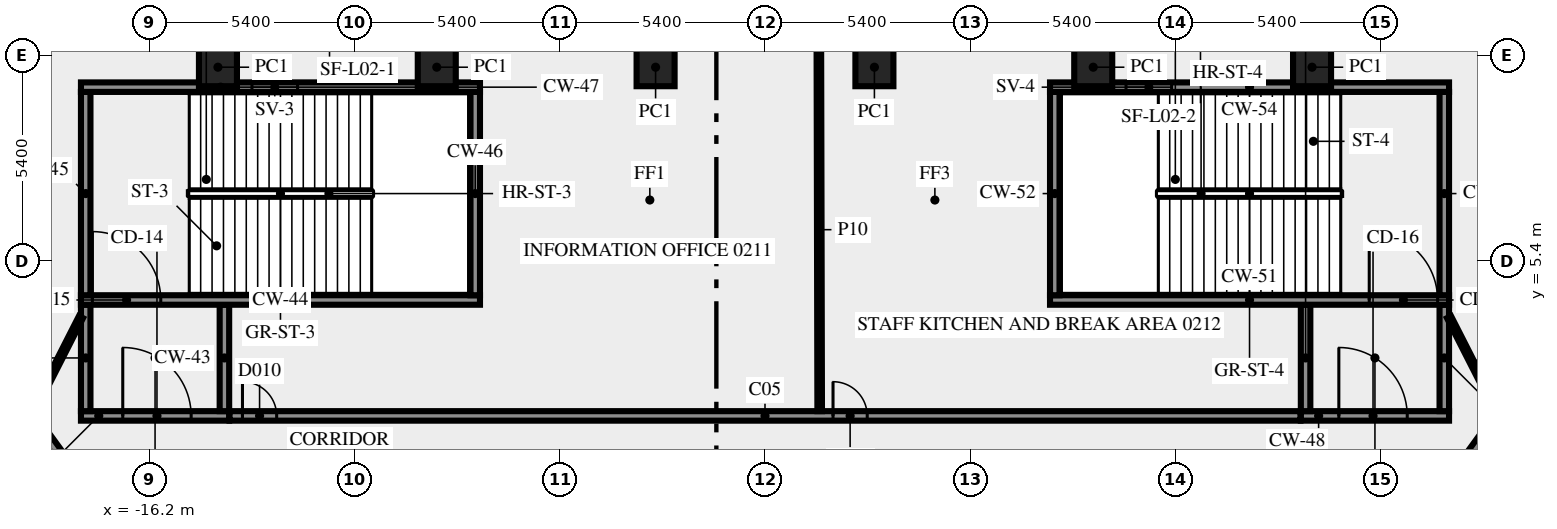
"""IFC4 building model, lengths in metres.
Left out: names, types, materials, properties, quantities, classifications, styles, units other than length and angle.
Written with IfcOpenShell. Run it as: python <this file> out.ifc"""

import sys

from ifc_helpers import new_model, si_unit, direction, frame, frame_2d, origin, origin_2d, place, context, subcontext, project, spatial, rectangle, extrude, element, fill, save


model = new_model("IFC4")
c1 = context("Model", 3, precision=1e-05, world=origin(), true_north=direction((0.0, 1.0)))
c2 = subcontext(c1, "Body", "Model", "MODEL_VIEW")
j1 = project(units=[si_unit("LENGTHUNIT", "METRE"), si_unit("PLANEANGLEUNIT", "RADIAN")], contexts=[c1])
p1 = place(None, origin())
s1 = spatial("IfcSite", under=j1, at=p1, CompositionType="ELEMENT")
p2 = place(p1, origin())
s2 = spatial("IfcBuilding", under=s1, at=p2, CompositionType="ELEMENT")
p3 = place(p2, frame((0.0, 0.0, 11.5)))
s3 = spatial("IfcBuildingStorey", under=s2, at=p3, CompositionType="ELEMENT", Elevation=11.5)
for number, where, z_axis, x_axis in (
    (1, (14.395, 10.5, 0.0), (0.0, 0.0, 1.0), (-1.0, 0.0, 0.0)),
    (2, (8.637, 10.5, 0.0), (0.0, 0.0, 1.0), (-1.0, 0.0, 0.0)),
    (3, (2.879, 10.5, 0.0), (0.0, 0.0, 1.0), (-1.0, 0.0, 0.0)),
    (4, (-2.879, 10.5, 0.0), (0.0, 0.0, 1.0), (-1.0, 0.0, 0.0)),
    (5, (-8.637, 10.5, 0.0), (0.0, 0.0, 1.0), (-1.0, 0.0, 0.0)),
    (6, (-14.395, 10.5, 0.0), (0.0, 0.0, 1.0), (-1.0, 0.0, 0.0)),
):
    element("IfcColumn", number, at=place(p3, frame(where, z_axis=z_axis, x_axis=x_axis)), inside=s3, PredefinedType="COLUMN", context=c2, shape_type="SweptSolid", body=[
        extrude(rectangle(XDim=1.0, YDim=1.0, at=origin_2d()), origin(), (0.0, 0.0, 1.0), 4.1),
    ])
p4 = place(p3, frame((-18.0, 1.325, 0.0), z_axis=(0.0, 0.0, 1.0), x_axis=(1.0, 0.0, 0.0)))
e7 = element("IfcWall", 7, at=p4, inside=s3, PredefinedType="SHEAR", context=c2, shape_type="SweptSolid", body=[
    extrude(rectangle(XDim=3.9, YDim=0.25, at=frame_2d((1.95, 0.0))), origin(), (0.0, 0.0, 1.0), 4.1),
])
p5 = place(p4, frame((1.1, 0.0, 0.0)))
e8 = element("IfcOpeningElement", 8, at=p5, cuts=e7, PredefinedType="OPENING", context=c2, shape_type="SweptSolid", body=[
    extrude(rectangle(XDim=1.8, YDim=2.1, at=frame_2d((0.9, 1.05))), frame((0.0, 0.135, 0.0), z_axis=(0.0, -1.0, 0.0), x_axis=(1.0, 0.0, 0.0)), (0.0, 0.0, 1.0), 0.27),
])
for number, where, z_axis, x_axis in (
    (9, (-17.875, 1.45, 0.0), (0.0, 0.0, 1.0), (0.0, 1.0, 0.0)),
    (10, (-14.225, 1.45, 0.0), (0.0, 0.0, 1.0), (0.0, 1.0, 0.0)),
):
    element("IfcWall", number, at=place(p3, frame(where, z_axis=z_axis, x_axis=x_axis)), inside=s3, PredefinedType="SHEAR", context=c2, shape_type="SweptSolid", body=[
        extrude(rectangle(XDim=2.8, YDim=0.25, at=frame_2d((1.4, 0.0))), origin(), (0.0, 0.0, 1.0), 4.1),
    ])
p6 = place(p3, frame((-18.0, 4.375, 0.0), z_axis=(0.0, 0.0, 1.0), x_axis=(1.0, 0.0, 0.0)))
e11 = element("IfcWall", 11, at=p6, inside=s3, PredefinedType="SHEAR", context=c2, shape_type="SweptSolid", body=[
    extrude(rectangle(XDim=10.5, YDim=0.25, at=frame_2d((5.25, 0.0))), origin(), (0.0, 0.0, 1.0), 4.1),
])
p7 = place(p6, frame((0.3, 0.0, 0.0)))
e12 = element("IfcOpeningElement", 12, at=p7, cuts=e11, PredefinedType="OPENING", context=c2, shape_type="SweptSolid", body=[
    extrude(rectangle(XDim=1.8, YDim=2.1, at=frame_2d((0.9, 1.05))), frame((0.0, 0.135, 0.0), z_axis=(0.0, -1.0, 0.0), x_axis=(1.0, 0.0, 0.0)), (0.0, 0.0, 1.0), 0.27),
])
for number, where, z_axis, x_axis in (
    (13, (-17.875, 4.5, 0.0), (0.0, 0.0, 1.0), (0.0, 1.0, 0.0)),
    (14, (-7.625, 4.5, 0.0), (0.0, 0.0, 1.0), (0.0, 1.0, 0.0)),
):
    element("IfcWall", number, at=place(p3, frame(where, z_axis=z_axis, x_axis=x_axis)), inside=s3, PredefinedType="SHEAR", context=c2, shape_type="SweptSolid", body=[
        extrude(rectangle(XDim=5.35, YDim=0.25, at=frame_2d((2.675, 0.0))), origin(), (0.0, 0.0, 1.0), 4.1),
    ])
p8 = place(p3, frame((-18.0, 9.975, 0.0), z_axis=(0.0, 0.0, 1.0), x_axis=(1.0, 0.0, 0.0)))
e15 = element("IfcWall", 15, at=p8, inside=s3, PredefinedType="SHEAR", context=c2, shape_type="SweptSolid", body=[
    extrude(rectangle(XDim=10.5, YDim=0.25, at=frame_2d((5.25, 0.0))), origin(), (0.0, 0.0, 1.0), 4.1),
])
p9 = place(p8, frame((4.5, 0.0, 1.0)))
e16 = element("IfcOpeningElement", 16, at=p9, cuts=e15, PredefinedType="OPENING", context=c2, shape_type="SweptSolid", body=[
    extrude(rectangle(XDim=1.2, YDim=1.2, at=frame_2d((0.6, 0.6))), frame((0.0, 0.135, 0.0), z_axis=(0.0, -1.0, 0.0), x_axis=(1.0, 0.0, 0.0)), (0.0, 0.0, 1.0), 0.27),
])
p10 = place(p3, frame((14.1, 1.325, 0.0), z_axis=(0.0, 0.0, 1.0), x_axis=(1.0, 0.0, 0.0)))
e17 = element("IfcWall", 17, at=p10, inside=s3, PredefinedType="SHEAR", context=c2, shape_type="SweptSolid", body=[
    extrude(rectangle(XDim=3.9, YDim=0.25, at=frame_2d((1.95, 0.0))), origin(), (0.0, 0.0, 1.0), 4.1),
])
p11 = place(p10, frame((1.0, 0.0, 0.0)))
e18 = element("IfcOpeningElement", 18, at=p11, cuts=e17, PredefinedType="OPENING", context=c2, shape_type="SweptSolid", body=[
    extrude(rectangle(XDim=1.8, YDim=2.1, at=frame_2d((0.9, 1.05))), frame((0.0, 0.135, 0.0), z_axis=(0.0, -1.0, 0.0), x_axis=(1.0, 0.0, 0.0)), (0.0, 0.0, 1.0), 0.27),
])
for number, where, z_axis, x_axis in (
    (19, (14.225, 1.45, 0.0), (0.0, 0.0, 1.0), (0.0, 1.0, 0.0)),
    (20, (17.875, 1.45, 0.0), (0.0, 0.0, 1.0), (0.0, 1.0, 0.0)),
):
    element("IfcWall", number, at=place(p3, frame(where, z_axis=z_axis, x_axis=x_axis)), inside=s3, PredefinedType="SHEAR", context=c2, shape_type="SweptSolid", body=[
        extrude(rectangle(XDim=2.8, YDim=0.25, at=frame_2d((1.4, 0.0))), origin(), (0.0, 0.0, 1.0), 4.1),
    ])
p12 = place(p3, frame((7.5, 4.375, 0.0), z_axis=(0.0, 0.0, 1.0), x_axis=(1.0, 0.0, 0.0)))
e21 = element("IfcWall", 21, at=p12, inside=s3, PredefinedType="SHEAR", context=c2, shape_type="SweptSolid", body=[
    extrude(rectangle(XDim=10.5, YDim=0.25, at=frame_2d((5.25, 0.0))), origin(), (0.0, 0.0, 1.0), 4.1),
])
p13 = place(p12, frame((8.4, 0.0, 0.0)))
e22 = element("IfcOpeningElement", 22, at=p13, cuts=e21, PredefinedType="OPENING", context=c2, shape_type="SweptSolid", body=[
    extrude(rectangle(XDim=1.8, YDim=2.1, at=frame_2d((0.9, 1.05))), frame((0.0, 0.135, 0.0), z_axis=(0.0, -1.0, 0.0), x_axis=(1.0, 0.0, 0.0)), (0.0, 0.0, 1.0), 0.27),
])
for number, where, z_axis, x_axis in (
    (23, (7.625, 4.5, 0.0), (0.0, 0.0, 1.0), (0.0, 1.0, 0.0)),
    (24, (17.875, 4.5, 0.0), (0.0, 0.0, 1.0), (0.0, 1.0, 0.0)),
):
    element("IfcWall", number, at=place(p3, frame(where, z_axis=z_axis, x_axis=x_axis)), inside=s3, PredefinedType="SHEAR", context=c2, shape_type="SweptSolid", body=[
        extrude(rectangle(XDim=5.35, YDim=0.25, at=frame_2d((2.675, 0.0))), origin(), (0.0, 0.0, 1.0), 4.1),
    ])
p14 = place(p3, frame((7.5, 9.975, 0.0), z_axis=(0.0, 0.0, 1.0), x_axis=(1.0, 0.0, 0.0)))
e25 = element("IfcWall", 25, at=p14, inside=s3, PredefinedType="SHEAR", context=c2, shape_type="SweptSolid", body=[
    extrude(rectangle(XDim=10.5, YDim=0.25, at=frame_2d((5.25, 0.0))), origin(), (0.0, 0.0, 1.0), 4.1),
])
p15 = place(p14, frame((2.0, 0.0, 1.0)))
e26 = element("IfcOpeningElement", 26, at=p15, cuts=e25, PredefinedType="OPENING", context=c2, shape_type="SweptSolid", body=[
    extrude(rectangle(XDim=1.2, YDim=1.2, at=frame_2d((0.6, 0.6))), frame((0.0, 0.135, 0.0), z_axis=(0.0, -1.0, 0.0), x_axis=(1.0, 0.0, 0.0)), (0.0, 0.0, 1.0), 0.27),
])
p16 = place(p3, frame((-37.232, 25.972, 0.0), z_axis=(0.0, 0.0, 1.0), x_axis=(0.587786323093, -0.809016216391, 0.0)))
e27 = element("IfcWall", 27, at=p16, inside=s3, PredefinedType="SOLIDWALL", context=c2, shape_type="SweptSolid", body=[
    extrude(rectangle(XDim=33.493, YDim=0.25, at=frame_2d((16.747, 0.0))), origin(), (0.0, 0.0, 1.0), 4.1),
])
p17 = place(p16, frame((4.438, 0.0, 0.0)))
e28 = element("IfcOpeningElement", 28, at=p17, cuts=e27, PredefinedType="OPENING", context=c2, shape_type="SweptSolid", body=[
    extrude(rectangle(XDim=1.8, YDim=2.1, at=frame_2d((0.9, 1.05))), frame((0.0, 0.135, 0.0), z_axis=(0.0, -1.0, 0.0), x_axis=(1.0, 0.0, 0.0)), (0.0, 0.0, 1.0), 0.27),
])
p18 = place(p16, frame((29.152, 0.0, 0.0)))
e29 = element("IfcOpeningElement", 29, at=p18, cuts=e27, PredefinedType="OPENING", context=c2, shape_type="SweptSolid", body=[
    extrude(rectangle(XDim=0.9, YDim=2.1, at=frame_2d((0.45, 1.05))), frame((0.0, 0.135, 0.0), z_axis=(0.0, -1.0, 0.0), x_axis=(1.0, 0.0, 0.0)), (0.0, 0.0, 1.0), 0.27),
])
p19 = place(p16, frame((14.835, 0.0, 0.0)))
e30 = element("IfcOpeningElement", 30, at=p19, cuts=e27, PredefinedType="OPENING", context=c2, shape_type="SweptSolid", body=[
    extrude(rectangle(XDim=0.9, YDim=2.1, at=frame_2d((0.45, 1.05))), frame((0.0, 0.135, 0.0), z_axis=(0.0, -1.0, 0.0), x_axis=(1.0, 0.0, 0.0)), (0.0, 0.0, 1.0), 0.27),
])
p20 = place(p3, frame((-14.09, 1.325, 0.0), z_axis=(0.0, 0.0, 1.0), x_axis=(1.0, 0.0, 0.0)))
e31 = element("IfcWall", 31, at=p20, inside=s3, PredefinedType="SOLIDWALL", context=c2, shape_type="SweptSolid", body=[
    extrude(rectangle(XDim=28.18, YDim=0.25, at=frame_2d((14.09, 0.0))), origin(), (0.0, 0.0, 1.0), 4.1),
])
p21 = place(p20, frame((0.34, 0.0, 0.0)))
e32 = element("IfcOpeningElement", 32, at=p21, cuts=e31, PredefinedType="OPENING", context=c2, shape_type="SweptSolid", body=[
    extrude(rectangle(XDim=0.9, YDim=2.1, at=frame_2d((0.45, 1.05))), frame((0.0, 0.135, 0.0), z_axis=(0.0, -1.0, 0.0), x_axis=(1.0, 0.0, 0.0)), (0.0, 0.0, 1.0), 0.27),
])
p22 = place(p20, frame((15.88, 0.0, 0.0)))
e33 = element("IfcOpeningElement", 33, at=p22, cuts=e31, PredefinedType="OPENING", context=c2, shape_type="SweptSolid", body=[
    extrude(rectangle(XDim=0.9, YDim=2.1, at=frame_2d((0.45, 1.05))), frame((0.0, 0.135, 0.0), z_axis=(0.0, -1.0, 0.0), x_axis=(1.0, 0.0, 0.0)), (0.0, 0.0, 1.0), 0.27),
])
p23 = place(p3, frame((17.545, -1.125, 0.0), z_axis=(0.0, 0.0, 1.0), x_axis=(0.587786323093, 0.809016216391, 0.0)))
e34 = element("IfcWall", 34, at=p23, inside=s3, PredefinedType="SOLIDWALL", context=c2, shape_type="SweptSolid", body=[
    extrude(rectangle(XDim=33.493, YDim=0.25, at=frame_2d((16.747, 0.0))), origin(), (0.0, 0.0, 1.0), 4.1),
])
p24 = place(p23, frame((3.441, 0.0, 0.0)))
e35 = element("IfcOpeningElement", 35, at=p24, cuts=e34, PredefinedType="OPENING", context=c2, shape_type="SweptSolid", body=[
    extrude(rectangle(XDim=0.9, YDim=2.1, at=frame_2d((0.45, 1.05))), frame((0.0, 0.135, 0.0), z_axis=(0.0, -1.0, 0.0), x_axis=(1.0, 0.0, 0.0)), (0.0, 0.0, 1.0), 0.27),
])
p25 = place(p23, frame((26.58, 0.0, 0.0)))
e36 = element("IfcOpeningElement", 36, at=p25, cuts=e34, PredefinedType="OPENING", context=c2, shape_type="SweptSolid", body=[
    extrude(rectangle(XDim=1.8, YDim=2.1, at=frame_2d((0.9, 1.05))), frame((0.0, 0.135, 0.0), z_axis=(0.0, -1.0, 0.0), x_axis=(1.0, 0.0, 0.0)), (0.0, 0.0, 1.0), 0.27),
])
p26 = place(p3, frame((1.439, 1.45, 0.0), z_axis=(0.0, 0.0, 1.0), x_axis=(-0.00224965558, 0.999997469522, 0.0)))
e37 = element("IfcWall", 37, at=p26, inside=s3, PredefinedType="PARTITIONING", context=c2, shape_type="SweptSolid", body=[
    extrude(rectangle(XDim=9.55, YDim=0.12, at=frame_2d((4.775, 0.0))), origin(), (0.0, 0.0, 1.0), 3.1),
])
for number, where, z_axis, x_axis in (
    (38, (18.0, 3.925, 0.0), (0.0, 0.0, 1.0), (0.454, -0.891, 0.0)),
    (39, (-19.261, 1.45, 0.0), (0.0, 0.0, 1.0), (0.454, 0.891, 0.0)),
):
    element("IfcWall", number, at=place(p3, frame(where, z_axis=z_axis, x_axis=x_axis)), inside=s3, PredefinedType="PARTITIONING", context=c2, shape_type="SweptSolid", body=[
        extrude(rectangle(XDim=2.778, YDim=0.12, at=frame_2d((1.389, 0.0))), origin(), (0.0, 0.0, 1.0), 4.1),
    ])
p27 = place(p5, origin())
e40 = element("IfcDoor", 40, at=p27, inside=s3, OperationType="DOUBLE_DOOR_SINGLE_SWING", PredefinedType="DOOR", context=c2, shape_type="SweptSolid", body=[
    extrude(rectangle(XDim=1.8, YDim=2.1, at=frame_2d((0.9, 1.05))), frame((0.0, 0.025, 0.0), z_axis=(0.0, -1.0, 0.0), x_axis=(1.0, 0.0, 0.0)), (0.0, 0.0, 1.0), 0.05),
])
fill(e8, e40)
p28 = place(p7, origin())
e41 = element("IfcDoor", 41, at=p28, inside=s3, OperationType="DOUBLE_DOOR_SINGLE_SWING", PredefinedType="DOOR", context=c2, shape_type="SweptSolid", body=[
    extrude(rectangle(XDim=1.8, YDim=2.1, at=frame_2d((0.9, 1.05))), frame((0.0, 0.025, 0.0), z_axis=(0.0, -1.0, 0.0), x_axis=(1.0, 0.0, 0.0)), (0.0, 0.0, 1.0), 0.05),
])
fill(e12, e41)
p29 = place(p9, origin())
e42 = element("IfcWindow", 42, at=p29, inside=s3, PartitioningType="SINGLE_PANEL", PredefinedType="WINDOW", context=c2, shape_type="SweptSolid", body=[
    extrude(rectangle(XDim=1.2, YDim=1.2, at=frame_2d((0.6, 0.6))), frame((0.0, 0.03, 0.0), z_axis=(0.0, -1.0, 0.0), x_axis=(1.0, 0.0, 0.0)), (0.0, 0.0, 1.0), 0.06),
])
fill(e16, e42)
p30 = place(p11, origin())
e43 = element("IfcDoor", 43, at=p30, inside=s3, OperationType="DOUBLE_DOOR_SINGLE_SWING", PredefinedType="DOOR", context=c2, shape_type="SweptSolid", body=[
    extrude(rectangle(XDim=1.8, YDim=2.1, at=frame_2d((0.9, 1.05))), frame((0.0, 0.025, 0.0), z_axis=(0.0, -1.0, 0.0), x_axis=(1.0, 0.0, 0.0)), (0.0, 0.0, 1.0), 0.05),
])
fill(e18, e43)
p31 = place(p13, origin())
e44 = element("IfcDoor", 44, at=p31, inside=s3, OperationType="DOUBLE_DOOR_SINGLE_SWING", PredefinedType="DOOR", context=c2, shape_type="SweptSolid", body=[
    extrude(rectangle(XDim=1.8, YDim=2.1, at=frame_2d((0.9, 1.05))), frame((0.0, 0.025, 0.0), z_axis=(0.0, -1.0, 0.0), x_axis=(1.0, 0.0, 0.0)), (0.0, 0.0, 1.0), 0.05),
])
fill(e22, e44)
p32 = place(p15, origin())
e45 = element("IfcWindow", 45, at=p32, inside=s3, PartitioningType="SINGLE_PANEL", PredefinedType="WINDOW", context=c2, shape_type="SweptSolid", body=[
    extrude(rectangle(XDim=1.2, YDim=1.2, at=frame_2d((0.6, 0.6))), frame((0.0, 0.03, 0.0), z_axis=(0.0, -1.0, 0.0), x_axis=(1.0, 0.0, 0.0)), (0.0, 0.0, 1.0), 0.06),
])
fill(e26, e45)
p33 = place(p21, origin())
e46 = element("IfcDoor", 46, at=p33, inside=s3, OperationType="SINGLE_SWING_LEFT", PredefinedType="DOOR", context=c2, shape_type="SweptSolid", body=[
    extrude(rectangle(XDim=0.9, YDim=2.1, at=frame_2d((0.45, 1.05))), frame((0.0, 0.025, 0.0), z_axis=(0.0, -1.0, 0.0), x_axis=(1.0, 0.0, 0.0)), (0.0, 0.0, 1.0), 0.05),
])
fill(e32, e46)
p34 = place(p22, origin())
e47 = element("IfcDoor", 47, at=p34, inside=s3, OperationType="SINGLE_SWING_LEFT", PredefinedType="DOOR", context=c2, shape_type="SweptSolid", body=[
    extrude(rectangle(XDim=0.9, YDim=2.1, at=frame_2d((0.45, 1.05))), frame((0.0, 0.025, 0.0), z_axis=(0.0, -1.0, 0.0), x_axis=(1.0, 0.0, 0.0)), (0.0, 0.0, 1.0), 0.05),
])
fill(e33, e47)
save(model, sys.argv[1])
